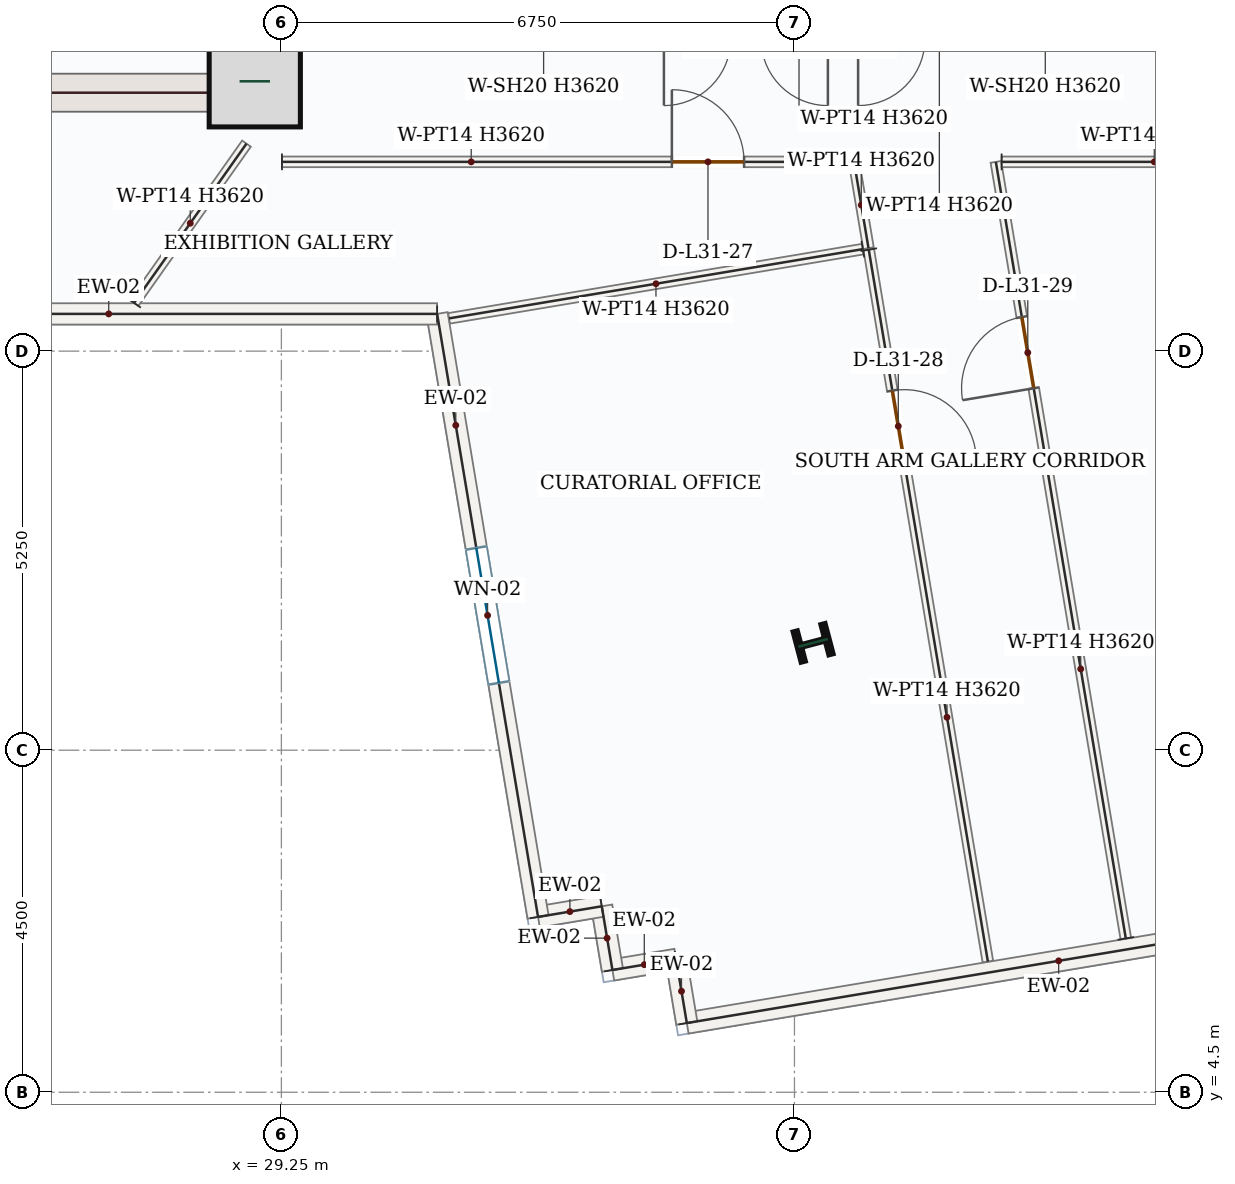
"""IFC4 building model, lengths in metres.
Left out: names, types, materials, properties, quantities, classifications, styles, units other than length and angle.
Written with IfcOpenShell. Run it as: python <this file> out.ifc"""

import sys

from ifc_helpers import new_model, si_unit, direction, frame, frame_2d, origin, origin_2d, place, context, subcontext, project, spatial, rectangle, i_section, extrude, source, transform, mapped, element, fill, save


model = new_model("IFC4")
c1 = context("Model", 3, precision=1e-05, world=origin(), true_north=direction((0.0, 1.0)))
c2 = subcontext(c1, "Body", "Model", "MODEL_VIEW")
j1 = project(units=[si_unit("LENGTHUNIT", "METRE"), si_unit("PLANEANGLEUNIT", "RADIAN")], contexts=[c1])
p1 = place(None, origin())
s1 = spatial("IfcSite", under=j1, at=p1, CompositionType="ELEMENT")
p2 = place(p1, origin())
s2 = spatial("IfcBuilding", under=s1, at=p2, CompositionType="ELEMENT")
p3 = place(p2, frame((0.0, 0.0, 139.5)))
s3 = spatial("IfcBuildingStorey", under=s2, at=p3, CompositionType="ELEMENT", Elevation=139.5)
p4 = place(p3, frame((29.0, 17.4, 0.0), z_axis=(0.0, 0.0, 1.0), x_axis=(0.0, 1.0, 0.0)))
e1 = element("IfcWall", 1, at=p4, inside=s3, PredefinedType="SHEAR", context=c2, shape_type="SweptSolid", body=[
    extrude(rectangle(XDim=8.55, YDim=0.5, at=frame_2d((4.275, 0.0))), origin(), (0.0, 0.0, 1.0), 3.62),
])
p5 = place(p4, frame((6.65, 0.0, 0.0)))
e2 = element("IfcOpeningElement", 2, at=p5, cuts=e1, PredefinedType="OPENING", context=c2, shape_type="SweptSolid", body=[
    extrude(rectangle(XDim=1.1, YDim=2.2, at=frame_2d((0.55, 1.1))), frame((0.0, 0.26, 0.0), z_axis=(0.0, -1.0, 0.0), x_axis=(1.0, 0.0, 0.0)), (0.0, 0.0, 1.0), 0.52),
])
p6 = place(p4, frame((2.7, 0.0, 0.0)))
e3 = element("IfcOpeningElement", 3, at=p6, cuts=e1, PredefinedType="OPENING", context=c2, shape_type="SweptSolid", body=[
    extrude(rectangle(XDim=0.88, YDim=2.1, at=frame_2d((0.44, 1.05))), frame((0.0, 0.26, 0.0), z_axis=(0.0, -1.0, 0.0), x_axis=(1.0, 0.0, 0.0)), (0.0, 0.0, 1.0), 0.52),
])
p7 = place(p4, frame((4.6, 0.0, 0.0)))
e4 = element("IfcOpeningElement", 4, at=p7, cuts=e1, PredefinedType="OPENING", context=c2, shape_type="SweptSolid", body=[
    extrude(rectangle(XDim=0.88, YDim=2.1, at=frame_2d((0.44, 1.05))), frame((0.0, 0.26, 0.0), z_axis=(0.0, -1.0, 0.0), x_axis=(1.0, 0.0, 0.0)), (0.0, 0.0, 1.0), 0.52),
])
m1 = source(origin(), c2, "Body", "SweptSolid", [
    extrude(rectangle(XDim=7.0, YDim=0.5, at=frame_2d((3.5, 0.0))), origin(), (0.0, 0.0, 1.0), 3.62),
])
p8 = place(p3, frame((21.75, 17.65, 0.0), z_axis=(0.0, 0.0, 1.0), x_axis=(1.0, 0.0, 0.0)))
e5 = element("IfcWall", 5, at=p8, inside=s3, PredefinedType="SHEAR", context=c2, shape_type="MappedRepresentation", body=[
    mapped(m1, transform((0.0, 0.0, 0.0), x_axis=(1.0, 0.0, 0.0), y_axis=(0.0, 1.0, 0.0), z_axis=(0.0, 0.0, 1.0), scale=1.0)),
])
m2 = source(origin(), c2, "Body", "SweptSolid", [
    extrude(rectangle(XDim=1.2, YDim=1.2, at=origin_2d()), origin(), (0.0, 0.0, 1.0), 3.9),
])
p9 = place(p3, frame((28.9, 17.8, 0.0), z_axis=(0.0, 0.0, 1.0), x_axis=(1.0, 0.0, 0.0)))
e6 = element("IfcColumn", 6, at=p9, inside=s3, PredefinedType="COLUMN", context=c2, shape_type="MappedRepresentation", body=[
    mapped(m2, transform((0.0, 0.0, 0.0), x_axis=(1.0, 0.0, 0.0), y_axis=(0.0, 1.0, 0.0), z_axis=(0.0, 0.0, 1.0), scale=1.0)),
])
m3 = source(origin(), c2, "Body", "SweptSolid", [
    extrude(i_section(OverallWidth=0.412, OverallDepth=0.435, WebThickness=0.036, FlangeThickness=0.057, FilletRadius=0.018, at=origin_2d()), origin(), (0.0, 0.0, 1.0), 3.9),
])
p10 = place(p3, frame((36.245, 10.412, 0.0), z_axis=(0.0, 0.0, 1.0), x_axis=(-0.255445757936, 0.966823388604, 0.0)))
e7 = element("IfcColumn", 7, at=p10, inside=s3, PredefinedType="COLUMN", context=c2, shape_type="MappedRepresentation", body=[
    mapped(m3, transform((0.0, 0.0, 0.0), x_axis=(1.0, 0.0, 0.0), y_axis=(0.0, 1.0, 0.0), z_axis=(0.0, 0.0, 1.0), scale=1.0)),
])
m4 = source(origin(), c2, "Body", "SweptSolid", [
    extrude(rectangle(XDim=9.92, YDim=0.28, at=frame_2d((4.96, 0.0))), origin(), (0.0, 0.0, 1.0), 3.62),
])
p11 = place(p3, frame((44.368, 7.048, 0.0), z_axis=(0.0, 0.0, 1.0), x_axis=(-0.986282616944, -0.165065440096, 0.0)))
e8 = element("IfcWall", 8, at=p11, inside=s3, PredefinedType="SOLIDWALL", context=c2, shape_type="MappedRepresentation", body=[
    mapped(m4, transform((0.0, 0.0, 0.0), x_axis=(1.0, 0.0, 0.0), y_axis=(0.0, 1.0, 0.0), z_axis=(0.0, 0.0, 1.0), scale=1.0)),
])
m5 = source(origin(), c2, "Body", "SweptSolid", [
    extrude(rectangle(XDim=0.85, YDim=0.28, at=frame_2d((0.425, 0.0))), origin(), (0.0, 0.0, 1.0), 3.62),
])
for number, where, z_axis, x_axis in (
    (9, (34.584, 5.41, 0.0), (0.0, 0.0, 1.0), (-0.165, 0.986, 0.0)),
    (10, (34.444, 6.249, 0.0), (0.0, 0.0, 1.0), (-0.986, -0.165, 0.0)),
):
    element("IfcWall", number, at=place(p3, frame(where, z_axis=z_axis, x_axis=x_axis)), inside=s3, PredefinedType="SOLIDWALL", context=c2, shape_type="MappedRepresentation", body=[
        mapped(m5, transform((0.0, 0.0, 0.0), x_axis=(1.0, 0.0, 0.0), y_axis=(0.0, 1.0, 0.0), z_axis=(0.0, 0.0, 1.0), scale=1.0)),
    ])
m6 = source(origin(), c2, "Body", "SweptSolid", [
    extrude(rectangle(XDim=0.85, YDim=0.28, at=frame_2d((0.425, 0.0))), origin(), (0.0, 0.0, 1.0), 3.62),
])
p12 = place(p3, frame((33.605, 6.108, 0.0), z_axis=(0.0, 0.0, 1.0), x_axis=(-0.164911450083, 0.986308376539, 0.0)))
e11 = element("IfcWall", 11, at=p12, inside=s3, PredefinedType="SOLIDWALL", context=c2, shape_type="MappedRepresentation", body=[
    mapped(m6, transform((0.0, 0.0, 0.0), x_axis=(1.0, 0.0, 0.0), y_axis=(0.0, 1.0, 0.0), z_axis=(0.0, 0.0, 1.0), scale=1.0)),
])
p13 = place(p3, frame((33.465, 6.947, 0.0), z_axis=(0.0, 0.0, 1.0), x_axis=(-0.986316186628, -0.164864732418, 0.0)))
e12 = element("IfcWall", 12, at=p13, inside=s3, PredefinedType="SOLIDWALL", context=c2, shape_type="MappedRepresentation", body=[
    mapped(m5, transform((0.0, 0.0, 0.0), x_axis=(1.0, 0.0, 0.0), y_axis=(0.0, 1.0, 0.0), z_axis=(0.0, 0.0, 1.0), scale=1.0)),
])
p14 = place(p3, frame((32.627, 6.806, 0.0), z_axis=(0.0, 0.0, 1.0), x_axis=(-0.165048626668, 0.986285430712, 0.0)))
e13 = element("IfcWall", 13, at=p14, inside=s3, PredefinedType="SOLIDWALL", context=c2, shape_type="SweptSolid", body=[
    extrude(rectangle(XDim=8.044, YDim=0.28, at=frame_2d((4.022, 0.0))), origin(), (0.0, 0.0, 1.0), 3.62),
])
p15 = place(p14, frame((3.122, 0.0, 0.85)))
e14 = element("IfcOpeningElement", 14, at=p15, cuts=e13, PredefinedType="OPENING", context=c2, shape_type="SweptSolid", body=[
    extrude(rectangle(XDim=1.8, YDim=1.75, at=frame_2d((0.9, 0.875))), frame((0.0, 0.15, 0.0), z_axis=(0.0, -1.0, 0.0), x_axis=(1.0, 0.0, 0.0)), (0.0, 0.0, 1.0), 0.3),
])
m7 = source(origin(), c2, "Body", "SweptSolid", [
    extrude(rectangle(XDim=8.641, YDim=0.28, at=frame_2d((4.321, 0.0))), origin(), (0.0, 0.0, 1.0), 3.62),
])
p16 = place(p3, frame((31.299, 14.74, 0.0), z_axis=(0.0, 0.0, 1.0), x_axis=(-1.0, 0.0, 0.0)))
e15 = element("IfcWall", 15, at=p16, inside=s3, PredefinedType="SOLIDWALL", context=c2, shape_type="MappedRepresentation", body=[
    mapped(m7, transform((0.0, 0.0, 0.0), x_axis=(1.0, 0.0, 0.0), y_axis=(0.0, 1.0, 0.0), z_axis=(0.0, 0.0, 1.0), scale=1.0)),
])
p17 = place(p3, frame((29.258, 16.74, 0.0), z_axis=(0.0, 0.0, 1.0), x_axis=(0.999999999474, -3.2436991e-05, 0.0)))
e16 = element("IfcWall", 16, at=p17, inside=s3, PredefinedType="PARTITIONING", context=c2, shape_type="SweptSolid", body=[
    extrude(rectangle(XDim=7.527, YDim=0.14, at=frame_2d((3.763, 0.0))), origin(), (0.0, 0.0, 1.0), 3.62),
])
p18 = place(p17, frame((5.13, 0.0, 0.0)))
e17 = element("IfcOpeningElement", 17, at=p18, cuts=e16, PredefinedType="OPENING", context=c2, shape_type="SweptSolid", body=[
    extrude(rectangle(XDim=0.95, YDim=2.15, at=frame_2d((0.475, 1.075))), frame((0.0, 0.08, 0.0), z_axis=(0.0, -1.0, 0.0), x_axis=(1.0, 0.0, 0.0)), (0.0, 0.0, 1.0), 0.16),
])
m8 = source(origin(), c2, "Body", "SweptSolid", [
    extrude(rectangle(XDim=1.151, YDim=0.14, at=frame_2d((0.576, 0.0))), origin(), (0.0, 0.0, 1.0), 3.62),
])
p19 = place(p3, frame((36.784, 16.74, 0.0), z_axis=(0.0, 0.0, 1.0), x_axis=(0.164983559387, -0.986296317104, 0.0)))
e18 = element("IfcWall", 18, at=p19, inside=s3, PredefinedType="PARTITIONING", context=c2, shape_type="MappedRepresentation", body=[
    mapped(m8, transform((0.0, 0.0, 0.0), x_axis=(1.0, 0.0, 0.0), y_axis=(0.0, 1.0, 0.0), z_axis=(0.0, 0.0, 1.0), scale=1.0)),
])
m9 = source(origin(), c2, "Body", "SweptSolid", [
    extrude(rectangle(XDim=5.52, YDim=0.14, at=frame_2d((2.76, 0.0))), origin(), (0.0, 0.0, 1.0), 3.62),
])
p20 = place(p3, frame((36.9, 15.592, 0.0), z_axis=(0.0, 0.0, 1.0), x_axis=(-0.986290930087, -0.165015760545, 0.0)))
e19 = element("IfcWall", 19, at=p20, inside=s3, PredefinedType="PARTITIONING", context=c2, shape_type="MappedRepresentation", body=[
    mapped(m9, transform((0.0, 0.0, 0.0), x_axis=(1.0, 0.0, 0.0), y_axis=(0.0, 1.0, 0.0), z_axis=(0.0, 0.0, 1.0), scale=1.0)),
])
m10 = source(origin(), c2, "Body", "SweptSolid", [
    extrude(rectangle(XDim=2.565, YDim=0.14, at=frame_2d((1.282, 0.0))), origin(), (0.0, 0.0, 1.0), 3.62),
])
p21 = place(p3, frame((27.311, 14.885, 0.0), z_axis=(0.0, 0.0, 1.0), x_axis=(0.576926084836, 0.816796359343, 0.0)))
e20 = element("IfcWall", 20, at=p21, inside=s3, PredefinedType="PARTITIONING", context=c2, shape_type="MappedRepresentation", body=[
    mapped(m10, transform((0.0, 0.0, 0.0), x_axis=(1.0, 0.0, 0.0), y_axis=(0.0, 1.0, 0.0), z_axis=(0.0, 0.0, 1.0), scale=1.0)),
])
p22 = place(p3, frame((36.978, 15.585, 0.0), z_axis=(0.0, 0.0, 1.0), x_axis=(0.165024399413, -0.986289484684, 0.0)))
e21 = element("IfcWall", 21, at=p22, inside=s3, PredefinedType="PARTITIONING", context=c2, shape_type="SweptSolid", body=[
    extrude(rectangle(XDim=9.495, YDim=0.14, at=frame_2d((4.748, 0.0))), origin(), (0.0, 0.0, 1.0), 3.62),
])
p23 = place(p22, frame((1.88, 0.0, 0.0)))
e22 = element("IfcOpeningElement", 22, at=p23, cuts=e21, PredefinedType="OPENING", context=c2, shape_type="SweptSolid", body=[
    extrude(rectangle(XDim=0.95, YDim=2.15, at=frame_2d((0.475, 1.075))), frame((0.0, 0.08, 0.0), z_axis=(0.0, -1.0, 0.0), x_axis=(1.0, 0.0, 0.0)), (0.0, 0.0, 1.0), 0.16),
])
p24 = place(p3, frame((40.359, 6.524, 0.0), z_axis=(0.0, 0.0, 1.0), x_axis=(-0.165056345303, 0.986284139016, 0.0)))
e23 = element("IfcWall", 23, at=p24, inside=s3, PredefinedType="PARTITIONING", context=c2, shape_type="SweptSolid", body=[
    extrude(rectangle(XDim=10.358, YDim=0.14, at=frame_2d((5.179, 0.0))), origin(), (0.0, 0.0, 1.0), 3.62),
])
p25 = place(p24, frame((7.338, 0.0, 0.0)))
e24 = element("IfcOpeningElement", 24, at=p25, cuts=e23, PredefinedType="OPENING", context=c2, shape_type="SweptSolid", body=[
    extrude(rectangle(XDim=0.95, YDim=2.15, at=frame_2d((0.475, 1.075))), frame((0.0, 0.08, 0.0), z_axis=(0.0, -1.0, 0.0), x_axis=(1.0, 0.0, 0.0)), (0.0, 0.0, 1.0), 0.16),
])
m11 = source(origin(), c2, "Body", "SweptSolid", [
    extrude(rectangle(XDim=4.017, YDim=0.14, at=frame_2d((2.008, 0.0))), origin(), (0.0, 0.0, 1.0), 3.079),
])
p26 = place(p3, frame((38.726, 16.74, 0.0), z_axis=(0.0, 0.0, 1.0), x_axis=(0.999999998153, 6.0779189e-05, 0.0)))
e25 = element("IfcWall", 25, at=p26, inside=s3, PredefinedType="PARTITIONING", context=c2, shape_type="MappedRepresentation", body=[
    mapped(m11, transform((0.0, 0.0, 0.0), x_axis=(1.0, 0.0, 0.0), y_axis=(0.0, 1.0, 0.0), z_axis=(0.0, 0.0, 1.0), scale=1.0)),
])
m12 = source(origin(), c2, "Body", "SweptSolid", [
    extrude(rectangle(XDim=1.8, YDim=1.75, at=frame_2d((0.9, 0.875))), frame((0.0, 0.03, 0.0), z_axis=(0.0, -1.0, 0.0), x_axis=(1.0, 0.0, 0.0)), (0.0, 0.0, 1.0), 0.06),
])
p27 = place(p15, origin())
e26 = element("IfcWindow", 26, at=p27, inside=s3, PartitioningType="DOUBLE_PANEL_VERTICAL", PredefinedType="WINDOW", context=c2, shape_type="MappedRepresentation", body=[
    mapped(m12, transform((0.0, 0.0, 0.0), x_axis=(1.0, 0.0, 0.0), y_axis=(0.0, 1.0, 0.0), z_axis=(0.0, 0.0, 1.0), scale=1.0)),
])
fill(e14, e26)
m13 = source(origin(), c2, "Body", "SweptSolid", [
    extrude(rectangle(XDim=0.95, YDim=2.15, at=frame_2d((0.475, 1.075))), frame((0.0, 0.025, 0.0), z_axis=(0.0, -1.0, 0.0), x_axis=(1.0, 0.0, 0.0)), (0.0, 0.0, 1.0), 0.05),
])
p28 = place(p18, origin())
e27 = element("IfcDoor", 27, at=p28, inside=s3, OperationType="SINGLE_SWING_LEFT", PredefinedType="DOOR", context=c2, shape_type="MappedRepresentation", body=[
    mapped(m13, transform((0.0, 0.0, 0.0), x_axis=(1.0, 0.0, 0.0), y_axis=(0.0, 1.0, 0.0), z_axis=(0.0, 0.0, 1.0), scale=1.0)),
])
fill(e17, e27)
p29 = place(p23, origin())
e28 = element("IfcDoor", 28, at=p29, inside=s3, OperationType="SINGLE_SWING_RIGHT", PredefinedType="DOOR", context=c2, shape_type="MappedRepresentation", body=[
    mapped(m13, transform((0.0, 0.0, 0.0), x_axis=(1.0, 0.0, 0.0), y_axis=(0.0, 1.0, 0.0), z_axis=(0.0, 0.0, 1.0), scale=1.0)),
])
fill(e22, e28)
p30 = place(p25, origin())
e29 = element("IfcDoor", 29, at=p30, inside=s3, OperationType="SINGLE_SWING_LEFT", PredefinedType="DOOR", context=c2, shape_type="MappedRepresentation", body=[
    mapped(m13, transform((0.0, 0.0, 0.0), x_axis=(1.0, 0.0, 0.0), y_axis=(0.0, 1.0, 0.0), z_axis=(0.0, 0.0, 1.0), scale=1.0)),
])
fill(e24, e29)
save(model, sys.argv[1])
